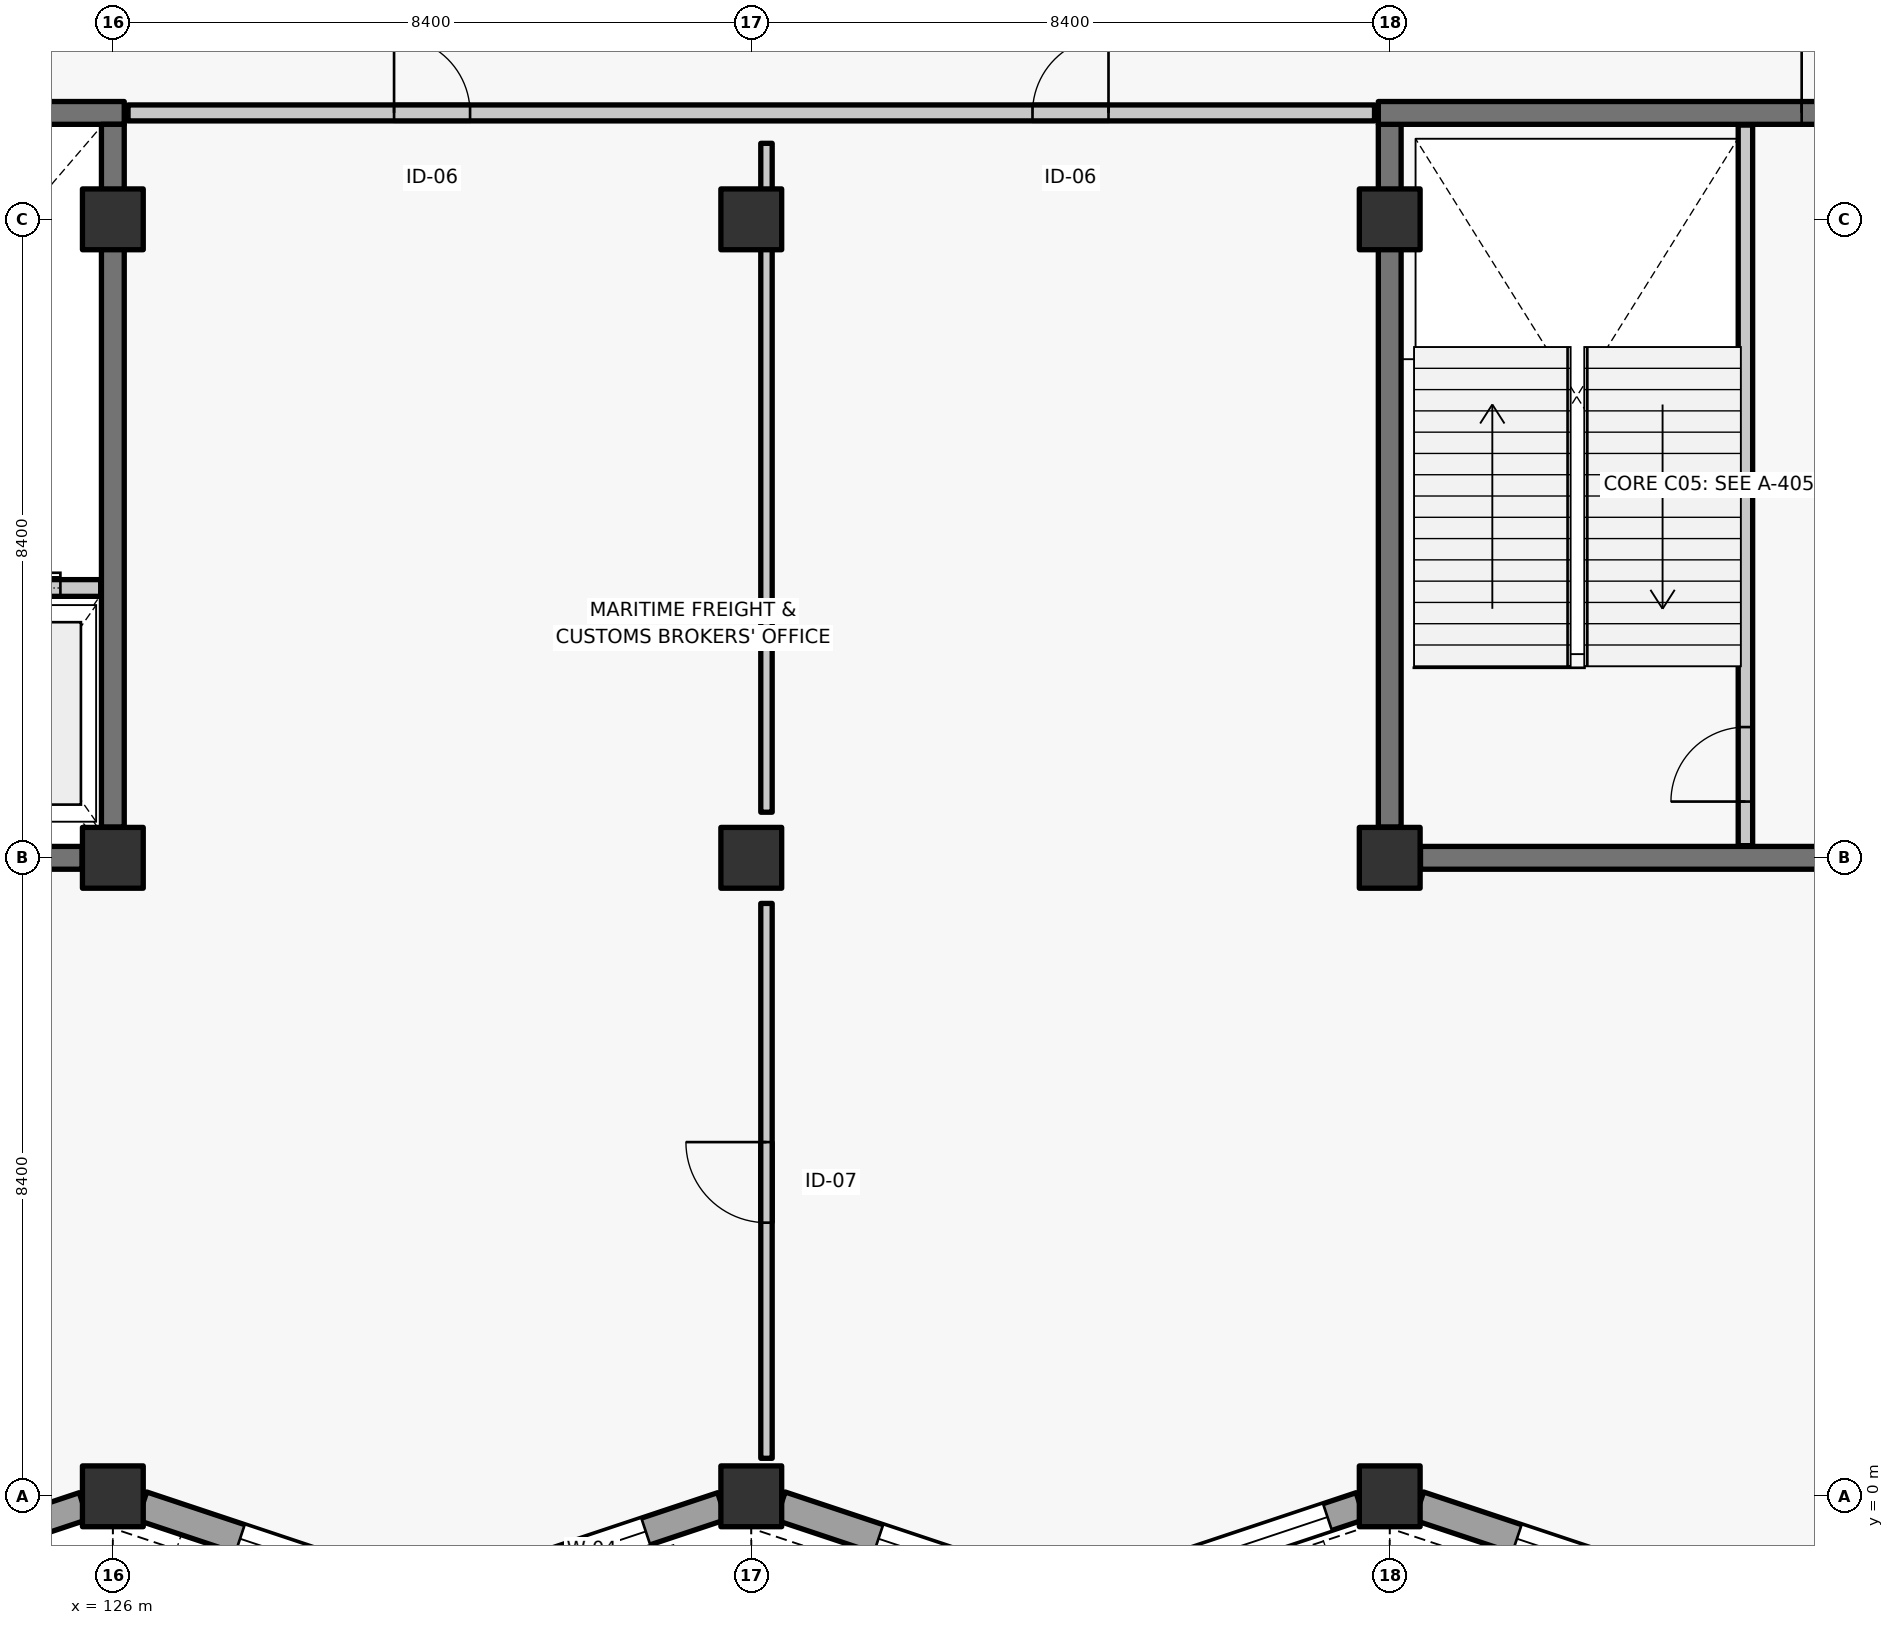
"""IFC4 building model, lengths in metres.
Left out: names, types, materials, properties, quantities, classifications, styles, units other than length and angle.
Written with IfcOpenShell. Run it as: python <this file> out.ifc"""

import sys

from ifc_helpers import new_model, si_unit, direction, frame, frame_2d, origin, origin_2d, place, context, subcontext, project, spatial, rectangle, extrude, element, fill, save


model = new_model("IFC4")
c1 = context("Model", 3, precision=1e-05, world=origin(), true_north=direction((0.0, 1.0)))
c2 = subcontext(c1, "Body", "Model", "MODEL_VIEW")
j1 = project(units=[si_unit("LENGTHUNIT", "METRE"), si_unit("PLANEANGLEUNIT", "RADIAN")], contexts=[c1])
p1 = place(None, origin())
s1 = spatial("IfcSite", under=j1, at=p1, CompositionType="ELEMENT")
p2 = place(p1, origin())
s2 = spatial("IfcBuilding", under=s1, at=p2, CompositionType="ELEMENT")
p3 = place(p2, frame((0.0, 0.0, 6.0)))
s3 = spatial("IfcBuildingStorey", under=s2, at=p3, CompositionType="ELEMENT", Elevation=6.0)
for number, where, z_axis, x_axis in (
    (1, (126.0, 0.0, 0.0), (0.0, 0.0, 1.0), (1.0, 0.0, 0.0)),
    (2, (126.0, 8.4, 0.0), (0.0, 0.0, 1.0), (1.0, 0.0, 0.0)),
    (3, (126.0, 16.8, 0.0), (0.0, 0.0, 1.0), (1.0, 0.0, 0.0)),
    (4, (134.4, 0.0, 0.0), (0.0, 0.0, 1.0), (1.0, 0.0, 0.0)),
    (5, (134.4, 8.4, 0.0), (0.0, 0.0, 1.0), (1.0, 0.0, 0.0)),
    (6, (134.4, 16.8, 0.0), (0.0, 0.0, 1.0), (1.0, 0.0, 0.0)),
    (7, (142.8, 0.0, 0.0), (0.0, 0.0, 1.0), (1.0, 0.0, 0.0)),
    (8, (142.8, 8.4, 0.0), (0.0, 0.0, 1.0), (1.0, 0.0, 0.0)),
    (9, (142.8, 16.8, 0.0), (0.0, 0.0, 1.0), (1.0, 0.0, 0.0)),
):
    element("IfcColumn", number, at=place(p3, frame(where, z_axis=z_axis, x_axis=x_axis)), inside=s3, PredefinedType="COLUMN", context=c2, shape_type="SweptSolid", body=[
        extrude(rectangle(XDim=0.8, YDim=0.8, at=origin_2d()), origin(), (0.0, 0.0, 1.0), 5.4),
    ])
p4 = place(p3, frame((125.616, -0.128, 0.0), z_axis=(0.0, 0.0, 1.0), x_axis=(-0.948695437545, -0.316191345203, 0.0)))
e10 = element("IfcWall", 10, at=p4, inside=s3, PredefinedType="SOLIDWALL", context=c2, shape_type="SweptSolid", body=[
    extrude(rectangle(XDim=4.022, YDim=0.37, at=frame_2d((2.011, 0.0))), origin(), (0.0, 0.0, 1.0), 5.12),
])
p5 = place(p4, frame((0.948, 0.0, 0.9)))
e11 = element("IfcOpeningElement", 11, at=p5, cuts=e10, PredefinedType="OPENING", context=c2, shape_type="SweptSolid", body=[
    extrude(rectangle(XDim=1.72, YDim=1.7, at=frame_2d((0.86, 0.85))), frame((0.0, 0.195, 0.0), z_axis=(0.0, -1.0, 0.0), x_axis=(1.0, 0.0, 0.0)), (0.0, 0.0, 1.0), 0.39),
])
p6 = place(p3, frame((130.2, -1.4, 0.0), z_axis=(0.0, 0.0, 1.0), x_axis=(-0.948695437545, 0.316191345203, 0.0)))
e12 = element("IfcWall", 12, at=p6, inside=s3, PredefinedType="SOLIDWALL", context=c2, shape_type="SweptSolid", body=[
    extrude(rectangle(XDim=4.022, YDim=0.39, at=frame_2d((2.011, 0.0))), origin(), (0.0, 0.0, 1.0), 5.12),
])
p7 = place(p6, frame((1.763, 0.0, 0.9)))
e13 = element("IfcOpeningElement", 13, at=p7, cuts=e12, PredefinedType="OPENING", context=c2, shape_type="SweptSolid", body=[
    extrude(rectangle(XDim=0.9, YDim=2.1, at=frame_2d((0.45, 1.05))), frame((0.0, 0.205, 0.0), z_axis=(0.0, -1.0, 0.0), x_axis=(1.0, 0.0, 0.0)), (0.0, 0.0, 1.0), 0.41),
])
p8 = place(p3, frame((134.016, -0.128, 0.0), z_axis=(0.0, 0.0, 1.0), x_axis=(-0.94870150572, -0.316173137767, 0.0)))
e14 = element("IfcWall", 14, at=p8, inside=s3, PredefinedType="SOLIDWALL", context=c2, shape_type="SweptSolid", body=[
    extrude(rectangle(XDim=4.022, YDim=0.37, at=frame_2d((2.011, 0.0))), origin(), (0.0, 0.0, 1.0), 5.12),
])
p9 = place(p8, frame((1.058, 0.0, 0.9)))
e15 = element("IfcOpeningElement", 15, at=p9, cuts=e14, PredefinedType="OPENING", context=c2, shape_type="SweptSolid", body=[
    extrude(rectangle(XDim=1.5, YDim=2.15, at=frame_2d((0.75, 1.075))), frame((0.0, 0.195, 0.0), z_axis=(0.0, -1.0, 0.0), x_axis=(1.0, 0.0, 0.0)), (0.0, 0.0, 1.0), 0.39),
])
p10 = place(p3, frame((138.6, -1.4, 0.0), z_axis=(0.0, 0.0, 1.0), x_axis=(-0.94870150572, 0.316173137767, 0.0)))
e16 = element("IfcWall", 16, at=p10, inside=s3, PredefinedType="SOLIDWALL", context=c2, shape_type="SweptSolid", body=[
    extrude(rectangle(XDim=4.022, YDim=0.39, at=frame_2d((2.011, 0.0))), origin(), (0.0, 0.0, 1.0), 5.12),
])
p11 = place(p10, frame((1.763, 0.0, 0.9)))
e17 = element("IfcOpeningElement", 17, at=p11, cuts=e16, PredefinedType="OPENING", context=c2, shape_type="SweptSolid", body=[
    extrude(rectangle(XDim=0.9, YDim=2.1, at=frame_2d((0.45, 1.05))), frame((0.0, 0.205, 0.0), z_axis=(0.0, -1.0, 0.0), x_axis=(1.0, 0.0, 0.0)), (0.0, 0.0, 1.0), 0.41),
])
p12 = place(p3, frame((142.416, -0.128, 0.0), z_axis=(0.0, 0.0, 1.0), x_axis=(-0.948695437545, -0.316191345203, 0.0)))
e18 = element("IfcWall", 18, at=p12, inside=s3, PredefinedType="SOLIDWALL", context=c2, shape_type="SweptSolid", body=[
    extrude(rectangle(XDim=4.022, YDim=0.37, at=frame_2d((2.011, 0.0))), origin(), (0.0, 0.0, 1.0), 5.12),
])
p13 = place(p12, frame((0.458, 0.0, 0.9)))
e19 = element("IfcOpeningElement", 19, at=p13, cuts=e18, PredefinedType="OPENING", context=c2, shape_type="SweptSolid", body=[
    extrude(rectangle(XDim=2.7, YDim=1.75, at=frame_2d((1.35, 0.875))), frame((0.0, 0.195, 0.0), z_axis=(0.0, -1.0, 0.0), x_axis=(1.0, 0.0, 0.0)), (0.0, 0.0, 1.0), 0.39),
])
p14 = place(p3, frame((147.0, -1.4, 0.0), z_axis=(0.0, 0.0, 1.0), x_axis=(-0.94870150572, 0.316173137767, 0.0)))
e20 = element("IfcWall", 20, at=p14, inside=s3, PredefinedType="SOLIDWALL", context=c2, shape_type="SweptSolid", body=[
    extrude(rectangle(XDim=4.022, YDim=0.39, at=frame_2d((2.011, 0.0))), origin(), (0.0, 0.0, 1.0), 5.12),
])
p15 = place(p14, frame((1.763, 0.0, 0.9)))
e21 = element("IfcOpeningElement", 21, at=p15, cuts=e20, PredefinedType="OPENING", context=c2, shape_type="SweptSolid", body=[
    extrude(rectangle(XDim=0.9, YDim=2.1, at=frame_2d((0.45, 1.05))), frame((0.0, 0.205, 0.0), z_axis=(0.0, -1.0, 0.0), x_axis=(1.0, 0.0, 0.0)), (0.0, 0.0, 1.0), 0.41),
])
p16 = place(p3, frame((150.816, -0.128, 0.0), z_axis=(0.0, 0.0, 1.0), x_axis=(-0.94870150572, -0.316173137767, 0.0)))
e22 = element("IfcWall", 22, at=p16, inside=s3, PredefinedType="SOLIDWALL", context=c2, shape_type="SweptSolid", body=[
    extrude(rectangle(XDim=4.022, YDim=0.37, at=frame_2d((2.011, 0.0))), origin(), (0.0, 0.0, 1.0), 5.12),
])
p17 = place(p16, frame((0.948, 0.0, 0.9)))
e23 = element("IfcOpeningElement", 23, at=p17, cuts=e22, PredefinedType="OPENING", context=c2, shape_type="SweptSolid", body=[
    extrude(rectangle(XDim=1.72, YDim=1.7, at=frame_2d((0.86, 0.85))), frame((0.0, 0.195, 0.0), z_axis=(0.0, -1.0, 0.0), x_axis=(1.0, 0.0, 0.0)), (0.0, 0.0, 1.0), 0.39),
])
p18 = place(p3, frame((125.595, 8.4, 0.0), z_axis=(0.0, 0.0, 1.0), x_axis=(-1.0, 0.0, 0.0)))
e24 = element("IfcWall", 24, at=p18, inside=s3, PredefinedType="SHEAR", context=c2, shape_type="SweptSolid", body=[
    extrude(rectangle(XDim=7.59, YDim=0.3, at=frame_2d((3.795, 0.0))), origin(), (0.0, 0.0, 1.0), 5.12),
])
p19 = place(p3, frame((117.45, 18.2, 0.0), z_axis=(0.0, 0.0, 1.0), x_axis=(1.0, 0.0, 0.0)))
e25 = element("IfcWall", 25, at=p19, inside=s3, PredefinedType="SHEAR", context=c2, shape_type="SweptSolid", body=[
    extrude(rectangle(XDim=8.7, YDim=0.3, at=frame_2d((4.35, 0.0))), origin(), (0.0, 0.0, 1.0), 5.12),
])
p20 = place(p19, frame((5.57, 0.0, 0.0)))
e26 = element("IfcOpeningElement", 26, at=p20, cuts=e25, PredefinedType="OPENING", context=c2, shape_type="SweptSolid", body=[
    extrude(rectangle(XDim=1.96, YDim=2.2, at=frame_2d((0.98, 1.1))), frame((0.0, 0.16, 0.0), z_axis=(0.0, -1.0, 0.0), x_axis=(1.0, 0.0, 0.0)), (0.0, 0.0, 1.0), 0.32),
])
p21 = place(p3, frame((126.0, 18.05, 0.0), z_axis=(0.0, 0.0, 1.0), x_axis=(0.0, -1.0, 0.0)))
e27 = element("IfcWall", 27, at=p21, inside=s3, PredefinedType="SHEAR", context=c2, shape_type="SweptSolid", body=[
    extrude(rectangle(XDim=9.245, YDim=0.3, at=frame_2d((4.623, 0.0))), origin(), (0.0, 0.0, 1.0), 5.12),
])
p22 = place(p3, frame((123.5, 11.95, 0.0), z_axis=(0.0, 0.0, 1.0), x_axis=(1.0, 0.0, 0.0)))
e28 = element("IfcWall", 28, at=p22, inside=s3, PredefinedType="SOLIDWALL", context=c2, shape_type="SweptSolid", body=[
    extrude(rectangle(XDim=2.34, YDim=0.22, at=frame_2d((1.17, 0.0))), origin(), (0.0, 0.0, 1.0), 5.12),
])
p23 = place(p22, frame((0.53, 0.0, 0.0)))
e29 = element("IfcOpeningElement", 29, at=p23, cuts=e28, PredefinedType="OPENING", context=c2, shape_type="SweptSolid", body=[
    extrude(rectangle(XDim=1.28, YDim=2.25, at=frame_2d((0.64, 1.125))), frame((0.0, 0.12, 0.0), z_axis=(0.0, -1.0, 0.0), x_axis=(1.0, 0.0, 0.0)), (0.0, 0.0, 1.0), 0.24),
])
p24 = place(p3, frame((150.795, 8.4, 0.0), z_axis=(0.0, 0.0, 1.0), x_axis=(-1.0, 0.0, 0.0)))
e30 = element("IfcWall", 30, at=p24, inside=s3, PredefinedType="SHEAR", context=c2, shape_type="SweptSolid", body=[
    extrude(rectangle(XDim=7.59, YDim=0.3, at=frame_2d((3.795, 0.0))), origin(), (0.0, 0.0, 1.0), 5.12),
])
p25 = place(p3, frame((142.8, 8.805, 0.0), z_axis=(0.0, 0.0, 1.0), x_axis=(0.0, 1.0, 0.0)))
e31 = element("IfcWall", 31, at=p25, inside=s3, PredefinedType="SHEAR", context=c2, shape_type="SweptSolid", body=[
    extrude(rectangle(XDim=9.245, YDim=0.3, at=frame_2d((4.623, 0.0))), origin(), (0.0, 0.0, 1.0), 5.12),
])
p26 = place(p3, frame((142.65, 18.2, 0.0), z_axis=(0.0, 0.0, 1.0), x_axis=(1.0, 0.0, 0.0)))
e32 = element("IfcWall", 32, at=p26, inside=s3, PredefinedType="SHEAR", context=c2, shape_type="SweptSolid", body=[
    extrude(rectangle(XDim=8.7, YDim=0.3, at=frame_2d((4.35, 0.0))), origin(), (0.0, 0.0, 1.0), 5.12),
])
p27 = place(p26, frame((5.57, 0.0, 0.0)))
e33 = element("IfcOpeningElement", 33, at=p27, cuts=e32, PredefinedType="OPENING", context=c2, shape_type="SweptSolid", body=[
    extrude(rectangle(XDim=1.96, YDim=2.2, at=frame_2d((0.98, 1.1))), frame((0.0, 0.16, 0.0), z_axis=(0.0, -1.0, 0.0), x_axis=(1.0, 0.0, 0.0)), (0.0, 0.0, 1.0), 0.32),
])
p28 = place(p3, frame((147.48, 8.56, 0.0), z_axis=(0.0, 0.0, 1.0), x_axis=(0.0, 1.0, 0.0)))
e34 = element("IfcWall", 34, at=p28, inside=s3, PredefinedType="SOLIDWALL", context=c2, shape_type="SweptSolid", body=[
    extrude(rectangle(XDim=9.48, YDim=0.19, at=frame_2d((4.74, 0.0))), origin(), (0.0, 0.0, 1.0), 5.12),
])
p29 = place(p28, frame((0.58, 0.0, 0.0)))
e35 = element("IfcOpeningElement", 35, at=p29, cuts=e34, PredefinedType="OPENING", context=c2, shape_type="SweptSolid", body=[
    extrude(rectangle(XDim=0.98, YDim=2.15, at=frame_2d((0.49, 1.075))), frame((0.0, 0.105, 0.0), z_axis=(0.0, -1.0, 0.0), x_axis=(1.0, 0.0, 0.0)), (0.0, 0.0, 1.0), 0.21),
])
p30 = place(p3, frame((126.2, 18.2, 0.0), z_axis=(0.0, 0.0, 1.0), x_axis=(1.0, 0.0, 0.0)))
e36 = element("IfcWall", 36, at=p30, inside=s3, PredefinedType="PARTITIONING", context=c2, shape_type="SweptSolid", body=[
    extrude(rectangle(XDim=16.4, YDim=0.21, at=frame_2d((8.2, 0.0))), origin(), (0.0, 0.0, 1.0), 5.12),
])
p31 = place(p30, frame((3.5, 0.0, 0.0)))
e37 = element("IfcOpeningElement", 37, at=p31, cuts=e36, PredefinedType="OPENING", context=c2, shape_type="SweptSolid", body=[
    extrude(rectangle(XDim=1.0, YDim=2.15, at=frame_2d((0.5, 1.075))), frame((0.0, 0.115, 0.0), z_axis=(0.0, -1.0, 0.0), x_axis=(1.0, 0.0, 0.0)), (0.0, 0.0, 1.0), 0.23),
])
p32 = place(p30, frame((11.9, 0.0, 0.0)))
e38 = element("IfcOpeningElement", 38, at=p32, cuts=e36, PredefinedType="OPENING", context=c2, shape_type="SweptSolid", body=[
    extrude(rectangle(XDim=1.0, YDim=2.15, at=frame_2d((0.5, 1.075))), frame((0.0, 0.115, 0.0), z_axis=(0.0, -1.0, 0.0), x_axis=(1.0, 0.0, 0.0)), (0.0, 0.0, 1.0), 0.23),
])
p33 = place(p3, frame((134.6, 0.5, 0.0), z_axis=(0.0, 0.0, 1.0), x_axis=(0.0, 1.0, 0.0)))
e39 = element("IfcWall", 39, at=p33, inside=s3, PredefinedType="PARTITIONING", context=c2, shape_type="SweptSolid", body=[
    extrude(rectangle(XDim=7.3, YDim=0.15, at=frame_2d((3.65, 0.0))), origin(), (0.0, 0.0, 1.0), 5.12),
])
p34 = place(p33, frame((3.1, 0.0, 0.0)))
e40 = element("IfcOpeningElement", 40, at=p34, cuts=e39, PredefinedType="OPENING", context=c2, shape_type="SweptSolid", body=[
    extrude(rectangle(XDim=1.06, YDim=2.18, at=frame_2d((0.53, 1.09))), frame((0.0, 0.085, 0.0), z_axis=(0.0, -1.0, 0.0), x_axis=(1.0, 0.0, 0.0)), (0.0, 0.0, 1.0), 0.17),
])
p35 = place(p3, frame((134.6, 9.0, 0.0), z_axis=(0.0, 0.0, 1.0), x_axis=(0.0, 1.0, 0.0)))
e41 = element("IfcWall", 41, at=p35, inside=s3, PredefinedType="PARTITIONING", context=c2, shape_type="SweptSolid", body=[
    extrude(rectangle(XDim=8.8, YDim=0.15, at=frame_2d((4.4, 0.0))), origin(), (0.0, 0.0, 1.0), 5.12),
])
p36 = place(p7, origin())
e42 = element("IfcWindow", 42, at=p36, inside=s3, PartitioningType="SINGLE_PANEL", PredefinedType="WINDOW", context=c2, shape_type="SweptSolid", body=[
    extrude(rectangle(XDim=0.9, YDim=2.1, at=frame_2d((0.45, 1.05))), frame((0.0, 0.03, 0.0), z_axis=(0.0, -1.0, 0.0), x_axis=(1.0, 0.0, 0.0)), (0.0, 0.0, 1.0), 0.06),
])
fill(e13, e42)
p37 = place(p9, origin())
e43 = element("IfcWindow", 43, at=p37, inside=s3, PartitioningType="SINGLE_PANEL", PredefinedType="WINDOW", context=c2, shape_type="SweptSolid", body=[
    extrude(rectangle(XDim=1.5, YDim=2.15, at=frame_2d((0.75, 1.075))), frame((0.0, 0.03, 0.0), z_axis=(0.0, -1.0, 0.0), x_axis=(1.0, 0.0, 0.0)), (0.0, 0.0, 1.0), 0.06),
])
fill(e15, e43)
p38 = place(p11, origin())
e44 = element("IfcWindow", 44, at=p38, inside=s3, PartitioningType="SINGLE_PANEL", PredefinedType="WINDOW", context=c2, shape_type="SweptSolid", body=[
    extrude(rectangle(XDim=0.9, YDim=2.1, at=frame_2d((0.45, 1.05))), frame((0.0, 0.03, 0.0), z_axis=(0.0, -1.0, 0.0), x_axis=(1.0, 0.0, 0.0)), (0.0, 0.0, 1.0), 0.06),
])
fill(e17, e44)
p39 = place(p13, origin())
e45 = element("IfcWindow", 45, at=p39, inside=s3, PartitioningType="SINGLE_PANEL", PredefinedType="WINDOW", context=c2, shape_type="SweptSolid", body=[
    extrude(rectangle(XDim=2.7, YDim=1.75, at=frame_2d((1.35, 0.875))), frame((0.0, 0.03, 0.0), z_axis=(0.0, -1.0, 0.0), x_axis=(1.0, 0.0, 0.0)), (0.0, 0.0, 1.0), 0.06),
])
fill(e19, e45)
p40 = place(p15, origin())
e46 = element("IfcWindow", 46, at=p40, inside=s3, PartitioningType="SINGLE_PANEL", PredefinedType="WINDOW", context=c2, shape_type="SweptSolid", body=[
    extrude(rectangle(XDim=0.9, YDim=2.1, at=frame_2d((0.45, 1.05))), frame((0.0, 0.03, 0.0), z_axis=(0.0, -1.0, 0.0), x_axis=(1.0, 0.0, 0.0)), (0.0, 0.0, 1.0), 0.06),
])
fill(e21, e46)
p41 = place(p17, origin())
e47 = element("IfcWindow", 47, at=p41, inside=s3, PartitioningType="SINGLE_PANEL", PredefinedType="WINDOW", context=c2, shape_type="SweptSolid", body=[
    extrude(rectangle(XDim=1.72, YDim=1.7, at=frame_2d((0.86, 0.85))), frame((0.0, 0.03, 0.0), z_axis=(0.0, -1.0, 0.0), x_axis=(1.0, 0.0, 0.0)), (0.0, 0.0, 1.0), 0.06),
])
fill(e23, e47)
p42 = place(p23, origin())
e48 = element("IfcDoor", 48, at=p42, inside=s3, OperationType="SLIDING_TO_RIGHT", PredefinedType="DOOR", context=c2, shape_type="SweptSolid", body=[
    extrude(rectangle(XDim=1.28, YDim=2.25, at=frame_2d((0.64, 1.125))), frame((0.0, 0.025, 0.0), z_axis=(0.0, -1.0, 0.0), x_axis=(1.0, 0.0, 0.0)), (0.0, 0.0, 1.0), 0.05),
])
fill(e29, e48)
p43 = place(p29, origin())
e49 = element("IfcDoor", 49, at=p43, inside=s3, OperationType="SINGLE_SWING_LEFT", PredefinedType="DOOR", context=c2, shape_type="SweptSolid", body=[
    extrude(rectangle(XDim=0.98, YDim=2.15, at=frame_2d((0.49, 1.075))), frame((0.0, 0.025, 0.0), z_axis=(0.0, -1.0, 0.0), x_axis=(1.0, 0.0, 0.0)), (0.0, 0.0, 1.0), 0.05),
])
fill(e35, e49)
p44 = place(p27, origin())
e50 = element("IfcDoor", 50, at=p44, inside=s3, OperationType="DOUBLE_DOOR_SINGLE_SWING", PredefinedType="DOOR", context=c2, shape_type="SweptSolid", body=[
    extrude(rectangle(XDim=1.96, YDim=2.2, at=frame_2d((0.98, 1.1))), frame((0.0, 0.025, 0.0), z_axis=(0.0, -1.0, 0.0), x_axis=(1.0, 0.0, 0.0)), (0.0, 0.0, 1.0), 0.05),
])
fill(e33, e50)
p45 = place(p31, origin())
e51 = element("IfcDoor", 51, at=p45, inside=s3, OperationType="SINGLE_SWING_LEFT", PredefinedType="DOOR", context=c2, shape_type="SweptSolid", body=[
    extrude(rectangle(XDim=1.0, YDim=2.15, at=frame_2d((0.5, 1.075))), frame((0.0, 0.025, 0.0), z_axis=(0.0, -1.0, 0.0), x_axis=(1.0, 0.0, 0.0)), (0.0, 0.0, 1.0), 0.05),
])
fill(e37, e51)
p46 = place(p32, origin())
e52 = element("IfcDoor", 52, at=p46, inside=s3, OperationType="SINGLE_SWING_RIGHT", PredefinedType="DOOR", context=c2, shape_type="SweptSolid", body=[
    extrude(rectangle(XDim=1.0, YDim=2.15, at=frame_2d((0.5, 1.075))), frame((0.0, 0.025, 0.0), z_axis=(0.0, -1.0, 0.0), x_axis=(1.0, 0.0, 0.0)), (0.0, 0.0, 1.0), 0.05),
])
fill(e38, e52)
p47 = place(p34, origin())
e53 = element("IfcDoor", 53, at=p47, inside=s3, OperationType="SINGLE_SWING_RIGHT", PredefinedType="DOOR", context=c2, shape_type="SweptSolid", body=[
    extrude(rectangle(XDim=1.06, YDim=2.18, at=frame_2d((0.53, 1.09))), frame((0.0, 0.025, 0.0), z_axis=(0.0, -1.0, 0.0), x_axis=(1.0, 0.0, 0.0)), (0.0, 0.0, 1.0), 0.05),
])
fill(e40, e53)
save(model, sys.argv[1])
